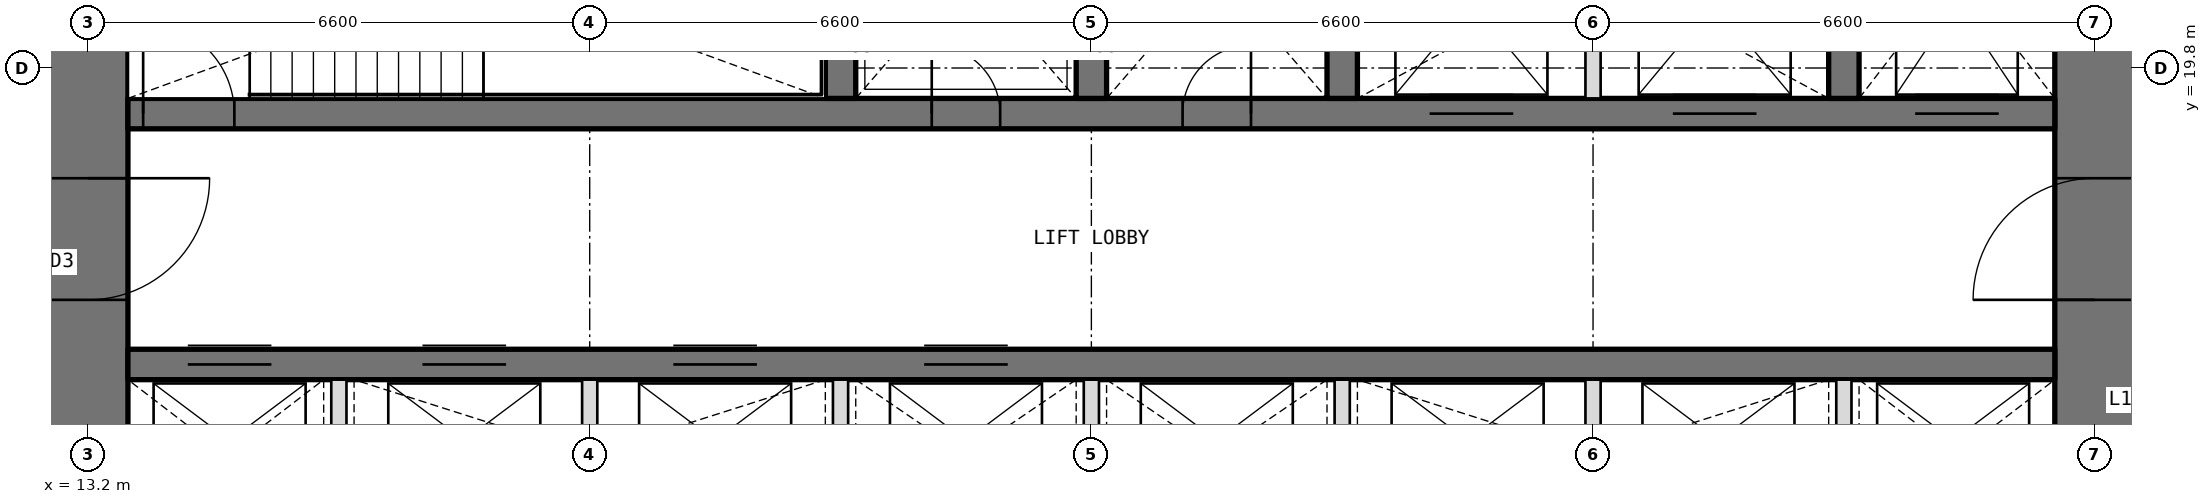
"""IFC4 building model, lengths in metres.
Left out: names, types, materials, properties, quantities, classifications, styles, units other than length and angle.
Written with IfcOpenShell. Run it as: python <this file> out.ifc"""

import sys

from ifc_helpers import new_model, si_unit, direction, frame, frame_2d, origin, place, context, subcontext, project, spatial, rectangle, extrude, element, fill, save


model = new_model("IFC4")
c1 = context("Model", 3, precision=1e-05, world=origin(), true_north=direction((0.0, 1.0)))
c2 = subcontext(c1, "Body", "Model", "MODEL_VIEW")
j1 = project(units=[si_unit("LENGTHUNIT", "METRE"), si_unit("PLANEANGLEUNIT", "RADIAN")], contexts=[c1])
p1 = place(None, origin())
s1 = spatial("IfcSite", under=j1, at=p1, CompositionType="ELEMENT")
p2 = place(p1, origin())
s2 = spatial("IfcBuilding", under=s1, at=p2, CompositionType="ELEMENT")
p3 = place(p2, frame((0.0, 0.0, 71.7)))
s3 = spatial("IfcBuildingStorey", under=s2, at=p3, CompositionType="ELEMENT", Elevation=71.7)
p4 = place(p3, frame((39.6, 13.725, 0.0), z_axis=(0.0, 0.0, 1.0), x_axis=(0.0, 1.0, 0.0)))
e1 = element("IfcWall", 1, at=p4, inside=s3, PredefinedType="SHEAR", context=c2, shape_type="SweptSolid", body=[
    extrude(rectangle(XDim=18.75, YDim=1.05, at=frame_2d((9.375, 0.0))), origin(), (0.0, 0.0, 1.0), 4.2),
])
p5 = place(p4, frame((3.025, 0.0, 0.0)))
e2 = element("IfcOpeningElement", 2, at=p5, cuts=e1, PredefinedType="OPENING", context=c2, shape_type="SweptSolid", body=[
    extrude(rectangle(XDim=1.6, YDim=2.1, at=frame_2d((0.8, 1.05))), frame((0.0, 0.535, 0.0), z_axis=(0.0, -1.0, 0.0), x_axis=(1.0, 0.0, 0.0)), (0.0, 0.0, 1.0), 1.07),
])
p6 = place(p4, frame((13.825, 0.0, 0.0)))
e3 = element("IfcOpeningElement", 3, at=p6, cuts=e1, PredefinedType="OPENING", context=c2, shape_type="SweptSolid", body=[
    extrude(rectangle(XDim=1.6, YDim=2.1, at=frame_2d((0.8, 1.05))), frame((0.0, 0.535, 0.0), z_axis=(0.0, -1.0, 0.0), x_axis=(1.0, 0.0, 0.0)), (0.0, 0.0, 1.0), 1.07),
])
p7 = place(p3, frame((13.2, 32.475, 0.0), z_axis=(0.0, 0.0, 1.0), x_axis=(0.0, -1.0, 0.0)))
e4 = element("IfcWall", 4, at=p7, inside=s3, PredefinedType="SHEAR", context=c2, shape_type="SweptSolid", body=[
    extrude(rectangle(XDim=18.75, YDim=1.05, at=frame_2d((9.375, 0.0))), origin(), (0.0, 0.0, 1.0), 4.2),
])
p8 = place(p7, frame((14.125, 0.0, 0.0)))
e5 = element("IfcOpeningElement", 5, at=p8, cuts=e4, PredefinedType="OPENING", context=c2, shape_type="SweptSolid", body=[
    extrude(rectangle(XDim=1.6, YDim=2.1, at=frame_2d((0.8, 1.05))), frame((0.0, 0.535, 0.0), z_axis=(0.0, -1.0, 0.0), x_axis=(1.0, 0.0, 0.0)), (0.0, 0.0, 1.0), 1.07),
])
p9 = place(p7, frame((3.325, 0.0, 0.0)))
e6 = element("IfcOpeningElement", 6, at=p9, cuts=e4, PredefinedType="OPENING", context=c2, shape_type="SweptSolid", body=[
    extrude(rectangle(XDim=1.6, YDim=2.1, at=frame_2d((0.8, 1.05))), frame((0.0, 0.535, 0.0), z_axis=(0.0, -1.0, 0.0), x_axis=(1.0, 0.0, 0.0)), (0.0, 0.0, 1.0), 1.07),
])
p10 = place(p3, frame((13.725, 15.9, 0.0), z_axis=(0.0, 0.0, 1.0), x_axis=(1.0, 0.0, 0.0)))
e7 = element("IfcWall", 7, at=p10, inside=s3, PredefinedType="SHEAR", context=c2, shape_type="SweptSolid", body=[
    extrude(rectangle(XDim=25.35, YDim=0.4, at=frame_2d((12.675, 0.0))), origin(), (0.0, 0.0, 1.0), 4.2),
])
p11 = place(p10, frame((0.788, 0.0, 0.0)))
e8 = element("IfcOpeningElement", 8, at=p11, cuts=e7, PredefinedType="OPENING", context=c2, shape_type="SweptSolid", body=[
    extrude(rectangle(XDim=1.1, YDim=2.1, at=frame_2d((0.55, 1.05))), frame((0.0, 0.21, 0.0), z_axis=(0.0, -1.0, 0.0), x_axis=(1.0, 0.0, 0.0)), (0.0, 0.0, 1.0), 0.42),
])
p12 = place(p10, frame((3.875, 0.0, 0.0)))
e9 = element("IfcOpeningElement", 9, at=p12, cuts=e7, PredefinedType="OPENING", context=c2, shape_type="SweptSolid", body=[
    extrude(rectangle(XDim=1.1, YDim=2.1, at=frame_2d((0.55, 1.05))), frame((0.0, 0.21, 0.0), z_axis=(0.0, -1.0, 0.0), x_axis=(1.0, 0.0, 0.0)), (0.0, 0.0, 1.0), 0.42),
])
p13 = place(p10, frame((7.175, 0.0, 0.0)))
e10 = element("IfcOpeningElement", 10, at=p13, cuts=e7, PredefinedType="OPENING", context=c2, shape_type="SweptSolid", body=[
    extrude(rectangle(XDim=1.1, YDim=2.1, at=frame_2d((0.55, 1.05))), frame((0.0, 0.21, 0.0), z_axis=(0.0, -1.0, 0.0), x_axis=(1.0, 0.0, 0.0)), (0.0, 0.0, 1.0), 0.42),
])
p14 = place(p10, frame((10.475, 0.0, 0.0)))
e11 = element("IfcOpeningElement", 11, at=p14, cuts=e7, PredefinedType="OPENING", context=c2, shape_type="SweptSolid", body=[
    extrude(rectangle(XDim=1.1, YDim=2.1, at=frame_2d((0.55, 1.05))), frame((0.0, 0.21, 0.0), z_axis=(0.0, -1.0, 0.0), x_axis=(1.0, 0.0, 0.0)), (0.0, 0.0, 1.0), 0.42),
])
p15 = place(p3, frame((13.725, 19.2, 0.0), z_axis=(0.0, 0.0, 1.0), x_axis=(1.0, 0.0, 0.0)))
e12 = element("IfcWall", 12, at=p15, inside=s3, PredefinedType="SHEAR", context=c2, shape_type="SweptSolid", body=[
    extrude(rectangle(XDim=25.35, YDim=0.4, at=frame_2d((12.675, 0.0))), origin(), (0.0, 0.0, 1.0), 4.2),
])
p16 = place(p15, frame((10.575, 0.0, 0.0)))
e13 = element("IfcOpeningElement", 13, at=p16, cuts=e12, PredefinedType="OPENING", context=c2, shape_type="SweptSolid", body=[
    extrude(rectangle(XDim=0.9, YDim=2.1, at=frame_2d((0.45, 1.05))), frame((0.0, 0.21, 0.0), z_axis=(0.0, -1.0, 0.0), x_axis=(1.0, 0.0, 0.0)), (0.0, 0.0, 1.0), 0.42),
])
p17 = place(p15, frame((13.875, 0.0, 0.0)))
e14 = element("IfcOpeningElement", 14, at=p17, cuts=e12, PredefinedType="OPENING", context=c2, shape_type="SweptSolid", body=[
    extrude(rectangle(XDim=0.9, YDim=2.1, at=frame_2d((0.45, 1.05))), frame((0.0, 0.21, 0.0), z_axis=(0.0, -1.0, 0.0), x_axis=(1.0, 0.0, 0.0)), (0.0, 0.0, 1.0), 0.42),
])
p18 = place(p15, frame((0.2, 0.0, 0.0)))
e15 = element("IfcOpeningElement", 15, at=p18, cuts=e12, PredefinedType="OPENING", context=c2, shape_type="SweptSolid", body=[
    extrude(rectangle(XDim=1.2, YDim=2.1, at=frame_2d((0.6, 1.05))), frame((0.0, 0.21, 0.0), z_axis=(0.0, -1.0, 0.0), x_axis=(1.0, 0.0, 0.0)), (0.0, 0.0, 1.0), 0.42),
])
p19 = place(p15, frame((23.512, 0.0, 0.0)))
e16 = element("IfcOpeningElement", 16, at=p19, cuts=e12, PredefinedType="OPENING", context=c2, shape_type="SweptSolid", body=[
    extrude(rectangle(XDim=1.1, YDim=2.1, at=frame_2d((0.55, 1.05))), frame((0.0, 0.21, 0.0), z_axis=(0.0, -1.0, 0.0), x_axis=(1.0, 0.0, 0.0)), (0.0, 0.0, 1.0), 0.42),
])
p20 = place(p15, frame((17.125, 0.0, 0.0)))
e17 = element("IfcOpeningElement", 17, at=p20, cuts=e12, PredefinedType="OPENING", context=c2, shape_type="SweptSolid", body=[
    extrude(rectangle(XDim=1.1, YDim=2.1, at=frame_2d((0.55, 1.05))), frame((0.0, 0.21, 0.0), z_axis=(0.0, -1.0, 0.0), x_axis=(1.0, 0.0, 0.0)), (0.0, 0.0, 1.0), 0.42),
])
p21 = place(p15, frame((20.325, 0.0, 0.0)))
e18 = element("IfcOpeningElement", 18, at=p21, cuts=e12, PredefinedType="OPENING", context=c2, shape_type="SweptSolid", body=[
    extrude(rectangle(XDim=1.1, YDim=2.1, at=frame_2d((0.55, 1.05))), frame((0.0, 0.21, 0.0), z_axis=(0.0, -1.0, 0.0), x_axis=(1.0, 0.0, 0.0)), (0.0, 0.0, 1.0), 0.42),
])
for number, where, z_axis, x_axis in (
    (19, (23.1, 19.4, 0.0), (0.0, 0.0, 1.0), (0.0, 1.0, 0.0)),
    (20, (26.4, 19.4, 0.0), (0.0, 0.0, 1.0), (0.0, 1.0, 0.0)),
    (21, (29.7, 19.4, 0.0), (0.0, 0.0, 1.0), (0.0, 1.0, 0.0)),
    (22, (36.3, 19.4, 0.0), (0.0, 0.0, 1.0), (0.0, 1.0, 0.0)),
):
    element("IfcWall", number, at=place(p3, frame(where, z_axis=z_axis, x_axis=x_axis)), inside=s3, PredefinedType="SHEAR", context=c2, shape_type="SweptSolid", body=[
        extrude(rectangle(XDim=3.35, YDim=0.4, at=frame_2d((1.675, 0.0))), origin(), (0.0, 0.0, 1.0), 4.2),
    ])
for number, where, z_axis, x_axis in (
    (23, (16.5, 13.725, 0.0), (0.0, 0.0, 1.0), (0.0, 1.0, 0.0)),
    (24, (19.8, 13.725, 0.0), (0.0, 0.0, 1.0), (0.0, 1.0, 0.0)),
    (25, (23.1, 13.725, 0.0), (0.0, 0.0, 1.0), (0.0, 1.0, 0.0)),
    (26, (26.4, 13.725, 0.0), (0.0, 0.0, 1.0), (0.0, 1.0, 0.0)),
    (27, (29.7, 13.725, 0.0), (0.0, 0.0, 1.0), (0.0, 1.0, 0.0)),
    (28, (33.0, 13.725, 0.0), (0.0, 0.0, 1.0), (0.0, 1.0, 0.0)),
    (29, (36.3, 13.725, 0.0), (0.0, 0.0, 1.0), (0.0, 1.0, 0.0)),
):
    element("IfcWall", number, at=place(p3, frame(where, z_axis=z_axis, x_axis=x_axis)), inside=s3, PredefinedType="PARTITIONING", context=c2, shape_type="SweptSolid", body=[
        extrude(rectangle(XDim=1.975, YDim=0.2, at=frame_2d((0.987, 0.0))), origin(), (0.0, 0.0, 1.0), 4.2),
    ])
p22 = place(p3, frame((33.0, 19.4, 0.0), z_axis=(0.0, 0.0, 1.0), x_axis=(0.0, 1.0, 0.0)))
e30 = element("IfcWall", 30, at=p22, inside=s3, PredefinedType="PARTITIONING", context=c2, shape_type="SweptSolid", body=[
    extrude(rectangle(XDim=3.35, YDim=0.2, at=frame_2d((1.675, 0.0))), origin(), (0.0, 0.0, 1.0), 4.2),
])
p23 = place(p16, origin())
e31 = element("IfcDoor", 31, at=p23, inside=s3, OperationType="SINGLE_SWING_LEFT", PredefinedType="DOOR", context=c2, shape_type="SweptSolid", body=[
    extrude(rectangle(XDim=0.9, YDim=2.1, at=frame_2d((0.45, 1.05))), frame((0.0, 0.025, 0.0), z_axis=(0.0, -1.0, 0.0), x_axis=(1.0, 0.0, 0.0)), (0.0, 0.0, 1.0), 0.05),
])
fill(e13, e31)
p24 = place(p17, origin())
e32 = element("IfcDoor", 32, at=p24, inside=s3, OperationType="SINGLE_SWING_RIGHT", PredefinedType="DOOR", context=c2, shape_type="SweptSolid", body=[
    extrude(rectangle(XDim=0.9, YDim=2.1, at=frame_2d((0.45, 1.05))), frame((0.0, 0.025, 0.0), z_axis=(0.0, -1.0, 0.0), x_axis=(1.0, 0.0, 0.0)), (0.0, 0.0, 1.0), 0.05),
])
fill(e14, e32)
p25 = place(p18, origin())
e33 = element("IfcDoor", 33, at=p25, inside=s3, OperationType="SINGLE_SWING_LEFT", PredefinedType="DOOR", context=c2, shape_type="SweptSolid", body=[
    extrude(rectangle(XDim=1.2, YDim=2.1, at=frame_2d((0.6, 1.05))), frame((0.0, 0.025, 0.0), z_axis=(0.0, -1.0, 0.0), x_axis=(1.0, 0.0, 0.0)), (0.0, 0.0, 1.0), 0.05),
])
fill(e15, e33)
p26 = place(p8, origin())
e34 = element("IfcDoor", 34, at=p26, inside=s3, OperationType="DOUBLE_DOOR_DOUBLE_SWING", PredefinedType="DOOR", context=c2, shape_type="SweptSolid", body=[
    extrude(rectangle(XDim=1.6, YDim=2.1, at=frame_2d((0.8, 1.05))), frame((0.0, 0.025, 0.0), z_axis=(0.0, -1.0, 0.0), x_axis=(1.0, 0.0, 0.0)), (0.0, 0.0, 1.0), 0.05),
])
fill(e5, e34)
p27 = place(p5, origin())
e35 = element("IfcDoor", 35, at=p27, inside=s3, OperationType="DOUBLE_DOOR_DOUBLE_SWING", PredefinedType="DOOR", context=c2, shape_type="SweptSolid", body=[
    extrude(rectangle(XDim=1.6, YDim=2.1, at=frame_2d((0.8, 1.05))), frame((0.0, 0.025, 0.0), z_axis=(0.0, -1.0, 0.0), x_axis=(1.0, 0.0, 0.0)), (0.0, 0.0, 1.0), 0.05),
])
fill(e2, e35)
p28 = place(p11, origin())
e36 = element("IfcDoor", 36, at=p28, inside=s3, OperationType="DOUBLE_DOOR_SLIDING", PredefinedType="DOOR", context=c2, shape_type="SweptSolid", body=[
    extrude(rectangle(XDim=1.1, YDim=2.1, at=frame_2d((0.55, 1.05))), frame((0.0, 0.025, 0.0), z_axis=(0.0, -1.0, 0.0), x_axis=(1.0, 0.0, 0.0)), (0.0, 0.0, 1.0), 0.05),
])
fill(e8, e36)
p29 = place(p12, origin())
e37 = element("IfcDoor", 37, at=p29, inside=s3, OperationType="DOUBLE_DOOR_SLIDING", PredefinedType="DOOR", context=c2, shape_type="SweptSolid", body=[
    extrude(rectangle(XDim=1.1, YDim=2.1, at=frame_2d((0.55, 1.05))), frame((0.0, 0.025, 0.0), z_axis=(0.0, -1.0, 0.0), x_axis=(1.0, 0.0, 0.0)), (0.0, 0.0, 1.0), 0.05),
])
fill(e9, e37)
p30 = place(p13, origin())
e38 = element("IfcDoor", 38, at=p30, inside=s3, OperationType="DOUBLE_DOOR_SLIDING", PredefinedType="DOOR", context=c2, shape_type="SweptSolid", body=[
    extrude(rectangle(XDim=1.1, YDim=2.1, at=frame_2d((0.55, 1.05))), frame((0.0, 0.025, 0.0), z_axis=(0.0, -1.0, 0.0), x_axis=(1.0, 0.0, 0.0)), (0.0, 0.0, 1.0), 0.05),
])
fill(e10, e38)
p31 = place(p14, origin())
e39 = element("IfcDoor", 39, at=p31, inside=s3, OperationType="DOUBLE_DOOR_SLIDING", PredefinedType="DOOR", context=c2, shape_type="SweptSolid", body=[
    extrude(rectangle(XDim=1.1, YDim=2.1, at=frame_2d((0.55, 1.05))), frame((0.0, 0.025, 0.0), z_axis=(0.0, -1.0, 0.0), x_axis=(1.0, 0.0, 0.0)), (0.0, 0.0, 1.0), 0.05),
])
fill(e11, e39)
p32 = place(p19, origin())
e40 = element("IfcDoor", 40, at=p32, inside=s3, OperationType="DOUBLE_DOOR_SLIDING", PredefinedType="DOOR", context=c2, shape_type="SweptSolid", body=[
    extrude(rectangle(XDim=1.1, YDim=2.1, at=frame_2d((0.55, 1.05))), frame((0.0, 0.025, 0.0), z_axis=(0.0, -1.0, 0.0), x_axis=(1.0, 0.0, 0.0)), (0.0, 0.0, 1.0), 0.05),
])
fill(e16, e40)
p33 = place(p20, origin())
e41 = element("IfcDoor", 41, at=p33, inside=s3, OperationType="DOUBLE_DOOR_SLIDING", PredefinedType="DOOR", context=c2, shape_type="SweptSolid", body=[
    extrude(rectangle(XDim=1.1, YDim=2.1, at=frame_2d((0.55, 1.05))), frame((0.0, 0.025, 0.0), z_axis=(0.0, -1.0, 0.0), x_axis=(1.0, 0.0, 0.0)), (0.0, 0.0, 1.0), 0.05),
])
fill(e17, e41)
p34 = place(p21, origin())
e42 = element("IfcDoor", 42, at=p34, inside=s3, OperationType="DOUBLE_DOOR_SLIDING", PredefinedType="DOOR", context=c2, shape_type="SweptSolid", body=[
    extrude(rectangle(XDim=1.1, YDim=2.1, at=frame_2d((0.55, 1.05))), frame((0.0, 0.025, 0.0), z_axis=(0.0, -1.0, 0.0), x_axis=(1.0, 0.0, 0.0)), (0.0, 0.0, 1.0), 0.05),
])
fill(e18, e42)
save(model, sys.argv[1])
